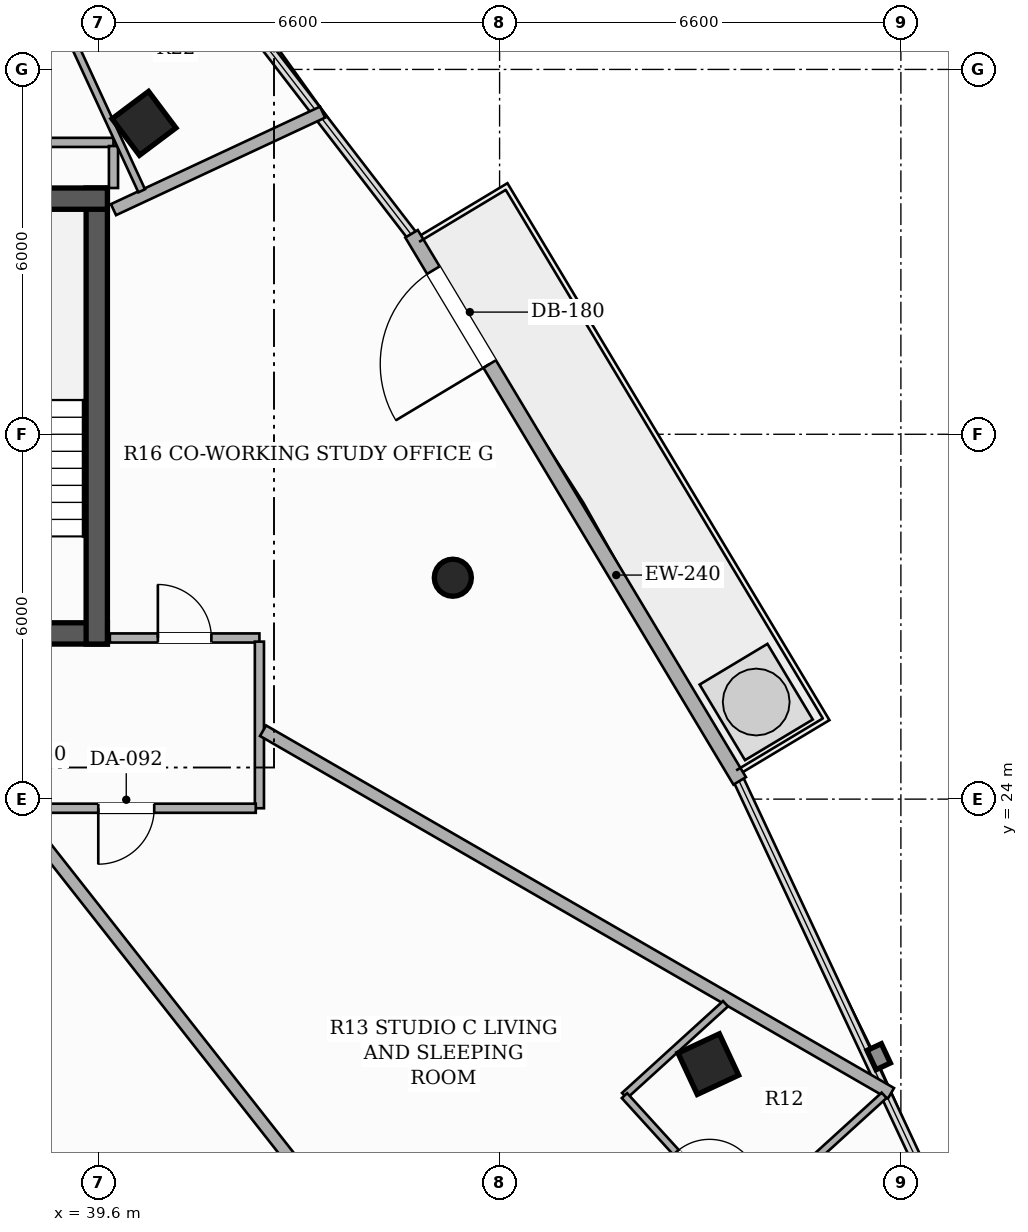
"""IFC4 building model, lengths in metres.
Left out: names, types, materials, properties, quantities, classifications, styles, units other than length and angle.
Written with IfcOpenShell. Run it as: python <this file> out.ifc"""

import sys

from ifc_helpers import new_model, si_unit, direction, frame, frame_2d, origin, origin_2d, place, context, subcontext, project, spatial, rectangle, hollow_rectangle, hollow_circle, extrude, element, fill, save


model = new_model("IFC4")
c1 = context("Model", 3, precision=1e-05, world=origin(), true_north=direction((0.0, 1.0)))
c2 = subcontext(c1, "Body", "Model", "MODEL_VIEW")
j1 = project(units=[si_unit("LENGTHUNIT", "METRE"), si_unit("PLANEANGLEUNIT", "RADIAN")], contexts=[c1])
p1 = place(None, origin())
s1 = spatial("IfcSite", under=j1, at=p1, CompositionType="ELEMENT")
p2 = place(p1, origin())
s2 = spatial("IfcBuilding", under=s1, at=p2, CompositionType="ELEMENT")
p3 = place(p2, frame((0.0, 0.0, 196.4)))
s3 = spatial("IfcBuildingStorey", under=s2, at=p3, CompositionType="ELEMENT", Elevation=196.4)
p4 = place(p3, frame((26.25, 26.725, 0.0), z_axis=(0.0, 0.0, 1.0), x_axis=(1.0, 0.0, 0.0)))
e1 = element("IfcWall", 1, at=p4, inside=s3, PredefinedType="SHEAR", context=c2, shape_type="SweptSolid", body=[
    extrude(rectangle(XDim=13.5, YDim=0.35, at=frame_2d((6.75, 0.0))), origin(), (0.0, 0.0, 1.0), 3.3),
])
p5 = place(p4, frame((4.35, 0.0, 0.0)))
e2 = element("IfcOpeningElement", 2, at=p5, cuts=e1, PredefinedType="OPENING", context=c2, shape_type="SweptSolid", body=[
    extrude(rectangle(XDim=1.05, YDim=2.15, at=frame_2d((0.525, 1.075))), frame((0.0, 0.185, 0.0), z_axis=(0.0, -1.0, 0.0), x_axis=(1.0, 0.0, 0.0)), (0.0, 0.0, 1.0), 0.37),
])
p6 = place(p4, frame((8.3, 0.0, 0.0)))
e3 = element("IfcOpeningElement", 3, at=p6, cuts=e1, PredefinedType="OPENING", context=c2, shape_type="SweptSolid", body=[
    extrude(rectangle(XDim=1.05, YDim=2.15, at=frame_2d((0.525, 1.075))), frame((0.0, 0.185, 0.0), z_axis=(0.0, -1.0, 0.0), x_axis=(1.0, 0.0, 0.0)), (0.0, 0.0, 1.0), 0.37),
])
p7 = place(p3, frame((39.575, 26.55, 0.0), z_axis=(0.0, 0.0, 1.0), x_axis=(0.0, 1.0, 0.0)))
e4 = element("IfcWall", 4, at=p7, inside=s3, PredefinedType="SHEAR", context=c2, shape_type="SweptSolid", body=[
    extrude(rectangle(XDim=7.5, YDim=0.35, at=frame_2d((3.75, 0.0))), origin(), (0.0, 0.0, 1.0), 3.3),
])
p8 = place(p3, frame((36.15, 33.875, 0.0), z_axis=(0.0, 0.0, 1.0), x_axis=(1.0, 0.0, 0.0)))
e5 = element("IfcWall", 5, at=p8, inside=s3, PredefinedType="SHEAR", context=c2, shape_type="SweptSolid", body=[
    extrude(rectangle(XDim=3.6, YDim=0.35, at=frame_2d((1.8, 0.0))), origin(), (0.0, 0.0, 1.0), 3.3),
])
p9 = place(p3, frame((49.633, 19.642, 0.0), z_axis=(0.0, 0.0, 1.0), x_axis=(-0.422618261741, 0.906307787037, 0.0)))
e6 = element("IfcColumn", 6, at=p9, inside=s3, PredefinedType="COLUMN", context=c2, shape_type="SweptSolid", body=[
    extrude(hollow_rectangle(XDim=0.75, YDim=0.75, WallThickness=0.025, at=origin_2d()), origin(), (0.0, 0.0, 1.0), 3.3),
])
p10 = place(p3, frame((45.431, 27.641, 0.0), z_axis=(0.0, 0.0, 1.0), x_axis=(1.0, 0.0, 0.0)))
e7 = element("IfcColumn", 7, at=p10, inside=s3, PredefinedType="COLUMN", context=c2, shape_type="SweptSolid", body=[
    extrude(hollow_circle(Radius=0.305, WallThickness=0.016, at=origin_2d()), origin(), (0.0, 0.0, 1.0), 3.3),
])
p11 = place(p3, frame((40.352, 35.113, 0.0), z_axis=(0.0, 0.0, 1.0), x_axis=(-0.600420225326, 0.799684658487, 0.0)))
e8 = element("IfcColumn", 8, at=p11, inside=s3, PredefinedType="COLUMN", context=c2, shape_type="SweptSolid", body=[
    extrude(hollow_rectangle(XDim=0.75, YDim=0.75, WallThickness=0.025, at=origin_2d()), origin(), (0.0, 0.0, 1.0), 3.3),
])
p12 = place(p3, frame((50.149, 24.3, 0.0), z_axis=(0.0, 0.0, 1.0), x_axis=(-0.514406779101, 0.857546305231, 0.0)))
e9 = element("IfcWall", 9, at=p12, inside=s3, PredefinedType="SOLIDWALL", context=c2, shape_type="SweptSolid", body=[
    extrude(rectangle(XDim=10.492, YDim=0.24, at=frame_2d((5.246, 0.0))), origin(), (0.0, 0.0, 1.0), 2.624),
])
p13 = place(p12, frame((7.994, 0.0, 0.0)))
e10 = element("IfcOpeningElement", 10, at=p13, cuts=e9, PredefinedType="OPENING", context=c2, shape_type="SweptSolid", body=[
    extrude(rectangle(XDim=1.8, YDim=2.2, at=frame_2d((0.9, 1.1))), frame((0.0, 0.13, 0.0), z_axis=(0.0, -1.0, 0.0), x_axis=(1.0, 0.0, 0.0)), (0.0, 0.0, 1.0), 0.26),
])
p14 = place(p3, frame((39.79, 26.65, 0.0), z_axis=(0.0, 0.0, 1.0), x_axis=(1.0, 0.0, 0.0)))
e11 = element("IfcWall", 11, at=p14, inside=s3, PredefinedType="PARTITIONING", context=c2, shape_type="SweptSolid", body=[
    extrude(rectangle(XDim=2.46, YDim=0.15, at=frame_2d((1.23, 0.0))), origin(), (0.0, 0.0, 1.0), 2.565),
])
p15 = place(p14, frame((0.79, 0.0, 0.0)))
e12 = element("IfcOpeningElement", 12, at=p15, cuts=e11, PredefinedType="OPENING", context=c2, shape_type="SweptSolid", body=[
    extrude(rectangle(XDim=0.88, YDim=2.1, at=frame_2d((0.44, 1.05))), frame((0.0, 0.085, 0.0), z_axis=(0.0, -1.0, 0.0), x_axis=(1.0, 0.0, 0.0)), (0.0, 0.0, 1.0), 0.17),
])
p16 = place(p3, frame((42.25, 26.59, 0.0), z_axis=(0.0, 0.0, 1.0), x_axis=(0.0, -1.0, 0.0)))
e13 = element("IfcWall", 13, at=p16, inside=s3, PredefinedType="PARTITIONING", context=c2, shape_type="SweptSolid", body=[
    extrude(rectangle(XDim=2.74, YDim=0.15, at=frame_2d((1.37, 0.0))), origin(), (0.0, 0.0, 1.0), 2.773),
])
p17 = place(p3, frame((42.19, 23.85, 0.0), z_axis=(0.0, 0.0, 1.0), x_axis=(-1.0, 0.0, 0.0)))
e14 = element("IfcWall", 14, at=p17, inside=s3, PredefinedType="PARTITIONING", context=c2, shape_type="SweptSolid", body=[
    extrude(rectangle(XDim=8.217, YDim=0.15, at=frame_2d((4.108, 0.0))), origin(), (0.0, 0.0, 1.0), 2.565),
])
p18 = place(p17, frame((1.67, 0.0, 0.0)))
e15 = element("IfcOpeningElement", 15, at=p18, cuts=e14, PredefinedType="OPENING", context=c2, shape_type="SweptSolid", body=[
    extrude(rectangle(XDim=0.92, YDim=2.15, at=frame_2d((0.46, 1.075))), frame((0.0, 0.085, 0.0), z_axis=(0.0, -1.0, 0.0), x_axis=(1.0, 0.0, 0.0)), (0.0, 0.0, 1.0), 0.17),
])
p19 = place(p17, frame((5.12, 0.0, 0.0)))
e16 = element("IfcOpeningElement", 16, at=p19, cuts=e14, PredefinedType="OPENING", context=c2, shape_type="SweptSolid", body=[
    extrude(rectangle(XDim=0.88, YDim=2.1, at=frame_2d((0.44, 1.05))), frame((0.0, 0.085, 0.0), z_axis=(0.0, -1.0, 0.0), x_axis=(1.0, 0.0, 0.0)), (0.0, 0.0, 1.0), 0.17),
])
p20 = place(p3, frame((36.31, 34.8, 0.0), z_axis=(0.0, 0.0, 1.0), x_axis=(1.0, 0.0, 0.0)))
e17 = element("IfcWall", 17, at=p20, inside=s3, PredefinedType="PARTITIONING", context=c2, shape_type="SweptSolid", body=[
    extrude(rectangle(XDim=3.54, YDim=0.15, at=frame_2d((1.77, 0.0))), origin(), (0.0, 0.0, 1.0), 2.425),
])
p21 = place(p3, frame((39.85, 34.74, 0.0), z_axis=(0.0, 0.0, 1.0), x_axis=(0.0, -1.0, 0.0)))
e18 = element("IfcWall", 18, at=p21, inside=s3, PredefinedType="PARTITIONING", context=c2, shape_type="SweptSolid", body=[
    extrude(rectangle(XDim=0.69, YDim=0.15, at=frame_2d((0.345, 0.0))), origin(), (0.0, 0.0, 1.0), 2.773),
])
p22 = place(p3, frame((52.214, 6.073, 0.0), z_axis=(0.0, 0.0, 1.0), x_axis=(-0.618246700658, 0.785984107425, 0.0)))
e19 = element("IfcWall", 19, at=p22, inside=s3, PredefinedType="PARTITIONING", context=c2, shape_type="SweptSolid", body=[
    extrude(rectangle(XDim=22.541, YDim=0.2, at=frame_2d((11.271, 0.0))), origin(), (0.0, 0.0, 1.0), 2.492),
])
p23 = place(p3, frame((42.31, 25.125, 0.0), z_axis=(0.0, 0.0, 1.0), x_axis=(0.866001812803, -0.500040858552, 0.0)))
e20 = element("IfcWall", 20, at=p23, inside=s3, PredefinedType="PARTITIONING", context=c2, shape_type="SweptSolid", body=[
    extrude(rectangle(XDim=11.925, YDim=0.2, at=frame_2d((5.962, 0.0))), origin(), (0.0, 0.0, 1.0), 2.492),
])
p24 = place(p3, frame((43.289, 35.298, 0.0), z_axis=(0.0, 0.0, 1.0), x_axis=(-0.906268592738, -0.422702304011, 0.0)))
e21 = element("IfcWall", 21, at=p24, inside=s3, PredefinedType="PARTITIONING", context=c2, shape_type="SweptSolid", body=[
    extrude(rectangle(XDim=3.795, YDim=0.2, at=frame_2d((1.897, 0.0))), origin(), (0.0, 0.0, 1.0), 2.492),
])
p25 = place(p3, frame((49.915, 20.635, 0.0), z_axis=(0.0, 0.0, 1.0), x_axis=(-0.739748179987, -0.672883816276, 0.0)))
e22 = element("IfcWall", 22, at=p25, inside=s3, PredefinedType="PARTITIONING", context=c2, shape_type="SweptSolid", body=[
    extrude(rectangle(XDim=2.246, YDim=0.12, at=frame_2d((1.123, 0.0))), origin(), (0.0, 0.0, 1.0), 2.492),
])
p26 = place(p3, frame((48.254, 19.124, 0.0), z_axis=(0.0, 0.0, 1.0), x_axis=(0.672884473084, -0.739747582546, 0.0)))
e23 = element("IfcWall", 23, at=p26, inside=s3, PredefinedType="PARTITIONING", context=c2, shape_type="SweptSolid", body=[
    extrude(rectangle(XDim=2.87, YDim=0.12, at=frame_2d((1.435, 0.0))), origin(), (0.0, 0.0, 1.0), 2.492),
])
p27 = place(p26, frame((1.26, 0.0, 0.0)))
e24 = element("IfcOpeningElement", 24, at=p27, cuts=e23, PredefinedType="OPENING", context=c2, shape_type="SweptSolid", body=[
    extrude(rectangle(XDim=0.82, YDim=2.1, at=frame_2d((0.41, 1.05))), frame((0.0, 0.07, 0.0), z_axis=(0.0, -1.0, 0.0), x_axis=(1.0, 0.0, 0.0)), (0.0, 0.0, 1.0), 0.14),
])
p28 = place(p3, frame((52.524, 19.129, 0.0), z_axis=(0.0, 0.0, 1.0), x_axis=(-0.739674496232, -0.672964813065, 0.0)))
e25 = element("IfcWall", 25, at=p28, inside=s3, PredefinedType="PARTITIONING", context=c2, shape_type="SweptSolid", body=[
    extrude(rectangle(XDim=3.162, YDim=0.12, at=frame_2d((1.581, 0.0))), origin(), (0.0, 0.0, 1.0), 2.492),
])
p29 = place(p3, frame((37.955, 39.114, 0.0), z_axis=(0.0, 0.0, 1.0), x_axis=(0.41911319203, -0.907933991139, 0.0)))
e26 = element("IfcWall", 26, at=p29, inside=s3, PredefinedType="PARTITIONING", context=c2, shape_type="SweptSolid", body=[
    extrude(rectangle(XDim=5.628, YDim=0.12, at=frame_2d((2.814, 0.0))), origin(), (0.0, 0.0, 1.0), 2.492),
])
p30 = place(p13, origin())
e27 = element("IfcDoor", 27, at=p30, inside=s3, OperationType="SINGLE_SWING_LEFT", PredefinedType="DOOR", context=c2, shape_type="SweptSolid", body=[
    extrude(rectangle(XDim=1.8, YDim=2.2, at=frame_2d((0.9, 1.1))), frame((0.0, 0.025, 0.0), z_axis=(0.0, -1.0, 0.0), x_axis=(1.0, 0.0, 0.0)), (0.0, 0.0, 1.0), 0.05),
])
fill(e10, e27)
p31 = place(p18, origin())
e28 = element("IfcDoor", 28, at=p31, inside=s3, OperationType="SINGLE_SWING_RIGHT", PredefinedType="DOOR", context=c2, shape_type="SweptSolid", body=[
    extrude(rectangle(XDim=0.92, YDim=2.15, at=frame_2d((0.46, 1.075))), frame((0.0, 0.025, 0.0), z_axis=(0.0, -1.0, 0.0), x_axis=(1.0, 0.0, 0.0)), (0.0, 0.0, 1.0), 0.05),
])
fill(e15, e28)
p32 = place(p27, origin())
e29 = element("IfcDoor", 29, at=p32, inside=s3, OperationType="SINGLE_SWING_RIGHT", PredefinedType="DOOR", context=c2, shape_type="SweptSolid", body=[
    extrude(rectangle(XDim=0.82, YDim=2.1, at=frame_2d((0.41, 1.05))), frame((0.0, 0.025, 0.0), z_axis=(0.0, -1.0, 0.0), x_axis=(1.0, 0.0, 0.0)), (0.0, 0.0, 1.0), 0.05),
])
fill(e24, e29)
p33 = place(p15, origin())
e30 = element("IfcDoor", 30, at=p33, inside=s3, OperationType="SINGLE_SWING_LEFT", PredefinedType="DOOR", context=c2, shape_type="SweptSolid", body=[
    extrude(rectangle(XDim=0.88, YDim=2.1, at=frame_2d((0.44, 1.05))), frame((0.0, 0.025, 0.0), z_axis=(0.0, -1.0, 0.0), x_axis=(1.0, 0.0, 0.0)), (0.0, 0.0, 1.0), 0.05),
])
fill(e12, e30)
save(model, sys.argv[1])
